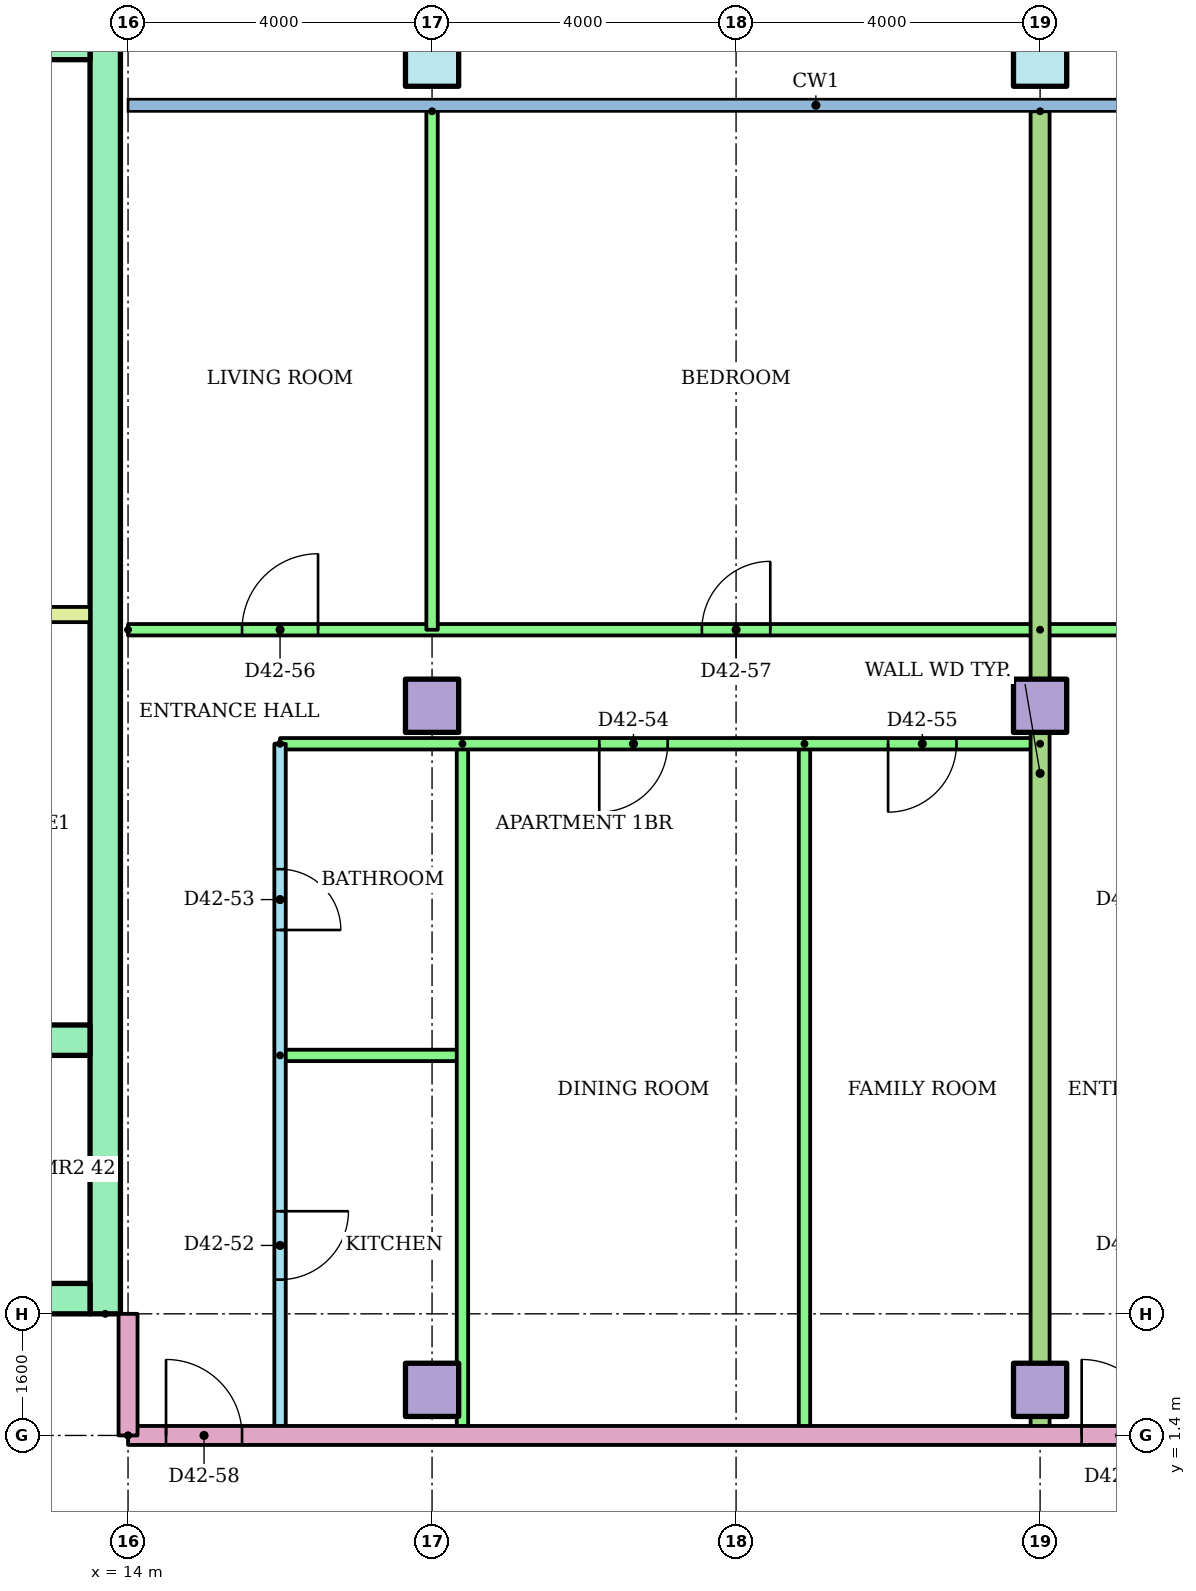
"""IFC4 building model, lengths in metres.
Left out: names, types, materials, properties, quantities, classifications, styles, units other than length and angle.
Written with IfcOpenShell. Run it as: python <this file> out.ifc"""

import sys

from ifc_helpers import new_model, si_unit, direction, frame, frame_2d, origin, origin_2d, place, context, subcontext, project, spatial, rectangle, hollow_rectangle, extrude, element, fill, save


model = new_model("IFC4")
c1 = context("Model", 3, precision=1e-05, world=origin(), true_north=direction((0.0, 1.0)))
c2 = subcontext(c1, "Body", "Model", "MODEL_VIEW")
j1 = project(units=[si_unit("LENGTHUNIT", "METRE"), si_unit("PLANEANGLEUNIT", "RADIAN")], contexts=[c1])
p1 = place(None, origin())
s1 = spatial("IfcSite", under=j1, at=p1, CompositionType="ELEMENT")
p2 = place(p1, origin())
s2 = spatial("IfcBuilding", under=s1, at=p2, CompositionType="ELEMENT")
p3 = place(p2, frame((0.0, 0.0, 165.3)))
s3 = spatial("IfcBuildingStorey", under=s2, at=p3, CompositionType="ELEMENT", Elevation=165.3)
for number, where in (
    (1, (18.0, 2.0, 0.0)),
    (2, (26.0, 2.0, 0.0)),
    (3, (18.0, 11.0, 0.0)),
    (4, (26.0, 11.0, 0.0)),
):
    element("IfcColumn", number, at=place(p3, frame(where)), inside=s3, PredefinedType="COLUMN", context=c2, shape_type="SweptSolid", body=[
        extrude(rectangle(XDim=0.7, YDim=0.7, at=origin_2d()), origin(), (0.0, 0.0, 1.0), 3.2),
    ])
for number, where in (
    (5, (18.0, 19.5, 0.0)),
    (6, (26.0, 19.5, 0.0)),
):
    element("IfcColumn", number, at=place(p3, frame(where)), inside=s3, PredefinedType="COLUMN", context=c2, shape_type="SweptSolid", body=[
        extrude(hollow_rectangle(XDim=0.7, YDim=0.7, WallThickness=0.036, at=origin_2d()), origin(), (0.0, 0.0, 1.0), 3.2),
    ])
p4 = place(p3, frame((13.7, 3.0, 0.0), z_axis=(0.0, 0.0, 1.0), x_axis=(0.0, 1.0, 0.0)))
e7 = element("IfcWall", 7, at=p4, inside=s3, PredefinedType="SHEAR", context=c2, shape_type="SweptSolid", body=[
    extrude(rectangle(XDim=17.0, YDim=0.4, at=frame_2d((8.5, 0.0))), origin(), (0.0, 0.0, 1.0), 2.92),
])
p5 = place(p3, frame((-13.5, 19.7, 0.0)))
e8 = element("IfcWall", 8, at=p5, inside=s3, PredefinedType="SHEAR", context=c2, shape_type="SweptSolid", body=[
    extrude(rectangle(XDim=27.0, YDim=0.4, at=frame_2d((13.5, 0.0))), origin(), (0.0, 0.0, 1.0), 2.92),
])
p6 = place(p3, frame((-13.5, 3.2, 0.0)))
e9 = element("IfcWall", 9, at=p6, inside=s3, PredefinedType="SHEAR", context=c2, shape_type="SweptSolid", body=[
    extrude(rectangle(XDim=27.0, YDim=0.4, at=frame_2d((13.5, 0.0))), origin(), (0.0, 0.0, 1.0), 2.92),
])
p7 = place(p6, frame((22.083, 0.0, 0.0)))
e10 = element("IfcOpeningElement", 10, at=p7, cuts=e9, PredefinedType="OPENING", context=c2, shape_type="SweptSolid", body=[
    extrude(rectangle(XDim=1.1, YDim=2.1, at=frame_2d((0.55, 1.05))), frame((0.0, 0.21, 0.0), z_axis=(0.0, -1.0, 0.0), x_axis=(1.0, 0.0, 0.0)), (0.0, 0.0, 1.0), 0.42),
])
p8 = place(p6, frame((25.128, 0.0, 0.0)))
e11 = element("IfcOpeningElement", 11, at=p8, cuts=e9, PredefinedType="OPENING", context=c2, shape_type="SweptSolid", body=[
    extrude(rectangle(XDim=1.1, YDim=2.1, at=frame_2d((0.55, 1.05))), frame((0.0, 0.21, 0.0), z_axis=(0.0, -1.0, 0.0), x_axis=(1.0, 0.0, 0.0)), (0.0, 0.0, 1.0), 0.42),
])
p9 = place(p6, frame((12.6, 0.0, 0.0)))
e12 = element("IfcOpeningElement", 12, at=p9, cuts=e9, PredefinedType="OPENING", context=c2, shape_type="SweptSolid", body=[
    extrude(rectangle(XDim=1.8, YDim=2.1, at=frame_2d((0.9, 1.05))), frame((0.0, 0.21, 0.0), z_axis=(0.0, -1.0, 0.0), x_axis=(1.0, 0.0, 0.0)), (0.0, 0.0, 1.0), 0.42),
])
p10 = place(p3, frame((1.522, 6.6, 0.0)))
e13 = element("IfcWall", 13, at=p10, inside=s3, PredefinedType="SHEAR", context=c2, shape_type="SweptSolid", body=[
    extrude(rectangle(XDim=11.978, YDim=0.4, at=frame_2d((5.989, 0.0))), origin(), (0.0, 0.0, 1.0), 2.92),
])
p11 = place(p10, frame((2.544, 0.0, 0.0)))
e14 = element("IfcOpeningElement", 14, at=p11, cuts=e13, PredefinedType="OPENING", context=c2, shape_type="SweptSolid", body=[
    extrude(rectangle(XDim=1.0, YDim=2.1, at=frame_2d((0.5, 1.05))), frame((0.0, 0.21, 0.0), z_axis=(0.0, -1.0, 0.0), x_axis=(1.0, 0.0, 0.0)), (0.0, 0.0, 1.0), 0.42),
])
p12 = place(p3, frame((9.6, 12.2, 0.0)))
e15 = element("IfcWall", 15, at=p12, inside=s3, PredefinedType="PARTITIONING", context=c2, shape_type="SweptSolid", body=[
    extrude(rectangle(XDim=3.9, YDim=0.2, at=frame_2d((1.95, 0.0))), origin(), (0.0, 0.0, 1.0), 2.92),
])
p13 = place(p3, frame((16.0, 10.5, 0.0), z_axis=(0.0, 0.0, 1.0), x_axis=(0.0, -1.0, 0.0)))
e16 = element("IfcWall", 16, at=p13, inside=s3, PredefinedType="PARTITIONING", context=c2, shape_type="SweptSolid", body=[
    extrude(rectangle(XDim=9.1, YDim=0.15, at=frame_2d((4.55, 0.0))), origin(), (0.0, 0.0, 1.0), 2.4),
])
p14 = place(p13, frame((6.15, 0.0, 0.0)))
e17 = element("IfcOpeningElement", 17, at=p14, cuts=e16, PredefinedType="OPENING", context=c2, shape_type="SweptSolid", body=[
    extrude(rectangle(XDim=0.9, YDim=2.1, at=frame_2d((0.45, 1.05))), frame((0.0, 0.085, 0.0), z_axis=(0.0, -1.0, 0.0), x_axis=(1.0, 0.0, 0.0)), (0.0, 0.0, 1.0), 0.17),
])
p15 = place(p13, frame((1.65, 0.0, 0.0)))
e18 = element("IfcOpeningElement", 18, at=p15, cuts=e16, PredefinedType="OPENING", context=c2, shape_type="SweptSolid", body=[
    extrude(rectangle(XDim=0.8, YDim=2.1, at=frame_2d((0.4, 1.05))), frame((0.0, 0.085, 0.0), z_axis=(0.0, -1.0, 0.0), x_axis=(1.0, 0.0, 0.0)), (0.0, 0.0, 1.0), 0.17),
])
p16 = place(p3, frame((16.0, 6.4, 0.0)))
e19 = element("IfcWall", 19, at=p16, inside=s3, PredefinedType="PARTITIONING", context=c2, shape_type="SweptSolid", body=[
    extrude(rectangle(XDim=2.4, YDim=0.15, at=frame_2d((1.2, 0.0))), origin(), (0.0, 0.0, 1.0), 2.4),
])
for number, where, z_axis, x_axis in (
    (20, (18.4, 10.5, 0.0), (0.0, 0.0, 1.0), (0.0, -1.0, 0.0)),
    (21, (22.9, 10.5, 0.0), (0.0, 0.0, 1.0), (0.0, -1.0, 0.0)),
):
    element("IfcWall", number, at=place(p3, frame(where, z_axis=z_axis, x_axis=x_axis)), inside=s3, PredefinedType="PARTITIONING", context=c2, shape_type="SweptSolid", body=[
        extrude(rectangle(XDim=9.1, YDim=0.15, at=frame_2d((4.55, 0.0))), origin(), (0.0, 0.0, 1.0), 2.4),
    ])
p17 = place(p3, frame((26.0, 10.5, 0.0), z_axis=(0.0, 0.0, 1.0), x_axis=(-1.0, 0.0, 0.0)))
e22 = element("IfcWall", 22, at=p17, inside=s3, PredefinedType="PARTITIONING", context=c2, shape_type="SweptSolid", body=[
    extrude(rectangle(XDim=10.0, YDim=0.15, at=frame_2d((5.0, 0.0))), origin(), (0.0, 0.0, 1.0), 2.4),
])
p18 = place(p17, frame((4.9, 0.0, 0.0)))
e23 = element("IfcOpeningElement", 23, at=p18, cuts=e22, PredefinedType="OPENING", context=c2, shape_type="SweptSolid", body=[
    extrude(rectangle(XDim=0.9, YDim=2.1, at=frame_2d((0.45, 1.05))), frame((0.0, 0.085, 0.0), z_axis=(0.0, -1.0, 0.0), x_axis=(1.0, 0.0, 0.0)), (0.0, 0.0, 1.0), 0.17),
])
p19 = place(p17, frame((1.1, 0.0, 0.0)))
e24 = element("IfcOpeningElement", 24, at=p19, cuts=e22, PredefinedType="OPENING", context=c2, shape_type="SweptSolid", body=[
    extrude(rectangle(XDim=0.9, YDim=2.1, at=frame_2d((0.45, 1.05))), frame((0.0, 0.085, 0.0), z_axis=(0.0, -1.0, 0.0), x_axis=(1.0, 0.0, 0.0)), (0.0, 0.0, 1.0), 0.17),
])
p20 = place(p3, frame((14.0, 12.0, 0.0)))
e25 = element("IfcWall", 25, at=p20, inside=s3, PredefinedType="PARTITIONING", context=c2, shape_type="SweptSolid", body=[
    extrude(rectangle(XDim=12.0, YDim=0.15, at=frame_2d((6.0, 0.0))), origin(), (0.0, 0.0, 1.0), 2.4),
])
p21 = place(p20, frame((1.5, 0.0, 0.0)))
e26 = element("IfcOpeningElement", 26, at=p21, cuts=e25, PredefinedType="OPENING", context=c2, shape_type="SweptSolid", body=[
    extrude(rectangle(XDim=1.0, YDim=2.1, at=frame_2d((0.5, 1.05))), frame((0.0, 0.085, 0.0), z_axis=(0.0, -1.0, 0.0), x_axis=(1.0, 0.0, 0.0)), (0.0, 0.0, 1.0), 0.17),
])
p22 = place(p20, frame((7.55, 0.0, 0.0)))
e27 = element("IfcOpeningElement", 27, at=p22, cuts=e25, PredefinedType="OPENING", context=c2, shape_type="SweptSolid", body=[
    extrude(rectangle(XDim=0.9, YDim=2.1, at=frame_2d((0.45, 1.05))), frame((0.0, 0.085, 0.0), z_axis=(0.0, -1.0, 0.0), x_axis=(1.0, 0.0, 0.0)), (0.0, 0.0, 1.0), 0.17),
])
p23 = place(p3, frame((18.0, 18.821, 0.0), z_axis=(0.0, 0.0, 1.0), x_axis=(0.0, -1.0, 0.0)))
e28 = element("IfcWall", 28, at=p23, inside=s3, PredefinedType="PARTITIONING", context=c2, shape_type="SweptSolid", body=[
    extrude(rectangle(XDim=6.821, YDim=0.15, at=frame_2d((3.411, 0.0))), origin(), (0.0, 0.0, 1.0), 2.4),
])
p24 = place(p3, frame((26.0, 12.0, 0.0)))
e29 = element("IfcWall", 29, at=p24, inside=s3, PredefinedType="PARTITIONING", context=c2, shape_type="SweptSolid", body=[
    extrude(rectangle(XDim=10.82, YDim=0.15, at=frame_2d((5.41, 0.0))), origin(), (0.0, 0.0, 1.0), 2.4),
])
p25 = place(p24, frame((2.55, 0.0, 0.0)))
e30 = element("IfcOpeningElement", 30, at=p25, cuts=e29, PredefinedType="OPENING", context=c2, shape_type="SweptSolid", body=[
    extrude(rectangle(XDim=1.0, YDim=2.1, at=frame_2d((0.5, 1.05))), frame((0.0, 0.085, 0.0), z_axis=(0.0, -1.0, 0.0), x_axis=(1.0, 0.0, 0.0)), (0.0, 0.0, 1.0), 0.17),
])
p26 = place(p24, frame((8.547, 0.0, 0.0)))
e31 = element("IfcOpeningElement", 31, at=p26, cuts=e29, PredefinedType="OPENING", context=c2, shape_type="SweptSolid", body=[
    extrude(rectangle(XDim=0.9, YDim=2.1, at=frame_2d((0.45, 1.05))), frame((0.0, 0.085, 0.0), z_axis=(0.0, -1.0, 0.0), x_axis=(1.0, 0.0, 0.0)), (0.0, 0.0, 1.0), 0.17),
])
p27 = place(p3, frame((26.0, 18.821, 0.0), z_axis=(0.0, 0.0, 1.0), x_axis=(0.0, -1.0, 0.0)))
e32 = element("IfcWall", 32, at=p27, inside=s3, PredefinedType="PARTITIONING", context=c2, shape_type="SweptSolid", body=[
    extrude(rectangle(XDim=17.421, YDim=0.25, at=frame_2d((8.71, 0.0))), origin(), (0.0, 0.0, 1.0), 2.4),
])
p28 = place(p3, frame((14.0, 1.4, 0.0)))
e33 = element("IfcWall", 33, at=p28, inside=s3, PredefinedType="PARTITIONING", context=c2, shape_type="SweptSolid", body=[
    extrude(rectangle(XDim=15.0, YDim=0.25, at=frame_2d((7.5, 0.0))), origin(), (0.0, 0.0, 1.0), 2.4),
])
p29 = place(p28, frame((0.5, 0.0, 0.0)))
e34 = element("IfcOpeningElement", 34, at=p29, cuts=e33, PredefinedType="OPENING", context=c2, shape_type="SweptSolid", body=[
    extrude(rectangle(XDim=1.0, YDim=2.1, at=frame_2d((0.5, 1.05))), frame((0.0, 0.135, 0.0), z_axis=(0.0, -1.0, 0.0), x_axis=(1.0, 0.0, 0.0)), (0.0, 0.0, 1.0), 0.27),
])
p30 = place(p28, frame((12.547, 0.0, 0.0)))
e35 = element("IfcOpeningElement", 35, at=p30, cuts=e33, PredefinedType="OPENING", context=c2, shape_type="SweptSolid", body=[
    extrude(rectangle(XDim=1.0, YDim=2.1, at=frame_2d((0.5, 1.05))), frame((0.0, 0.135, 0.0), z_axis=(0.0, -1.0, 0.0), x_axis=(1.0, 0.0, 0.0)), (0.0, 0.0, 1.0), 0.27),
])
p31 = place(p3, frame((14.0, 1.4, 0.0), z_axis=(0.0, 0.0, 1.0), x_axis=(0.0, 1.0, 0.0)))
e36 = element("IfcWall", 36, at=p31, inside=s3, PredefinedType="PARTITIONING", context=c2, shape_type="SweptSolid", body=[
    extrude(rectangle(XDim=1.6, YDim=0.25, at=frame_2d((0.8, 0.0))), origin(), (0.0, 0.0, 1.0), 2.4),
])
p32 = place(p14, origin())
e37 = element("IfcDoor", 37, at=p32, inside=s3, OperationType="SINGLE_SWING_LEFT", PredefinedType="DOOR", context=c2, shape_type="SweptSolid", body=[
    extrude(rectangle(XDim=0.9, YDim=2.1, at=frame_2d((0.45, 1.05))), frame((0.0, 0.025, 0.0), z_axis=(0.0, -1.0, 0.0), x_axis=(1.0, 0.0, 0.0)), (0.0, 0.0, 1.0), 0.05),
])
fill(e17, e37)
p33 = place(p15, origin())
e38 = element("IfcDoor", 38, at=p33, inside=s3, OperationType="SINGLE_SWING_RIGHT", PredefinedType="DOOR", context=c2, shape_type="SweptSolid", body=[
    extrude(rectangle(XDim=0.8, YDim=2.1, at=frame_2d((0.4, 1.05))), frame((0.0, 0.025, 0.0), z_axis=(0.0, -1.0, 0.0), x_axis=(1.0, 0.0, 0.0)), (0.0, 0.0, 1.0), 0.05),
])
fill(e18, e38)
p34 = place(p18, origin())
e39 = element("IfcDoor", 39, at=p34, inside=s3, OperationType="SINGLE_SWING_RIGHT", PredefinedType="DOOR", context=c2, shape_type="SweptSolid", body=[
    extrude(rectangle(XDim=0.9, YDim=2.1, at=frame_2d((0.45, 1.05))), frame((0.0, 0.025, 0.0), z_axis=(0.0, -1.0, 0.0), x_axis=(1.0, 0.0, 0.0)), (0.0, 0.0, 1.0), 0.05),
])
fill(e23, e39)
p35 = place(p19, origin())
e40 = element("IfcDoor", 40, at=p35, inside=s3, OperationType="SINGLE_SWING_RIGHT", PredefinedType="DOOR", context=c2, shape_type="SweptSolid", body=[
    extrude(rectangle(XDim=0.9, YDim=2.1, at=frame_2d((0.45, 1.05))), frame((0.0, 0.025, 0.0), z_axis=(0.0, -1.0, 0.0), x_axis=(1.0, 0.0, 0.0)), (0.0, 0.0, 1.0), 0.05),
])
fill(e24, e40)
p36 = place(p21, origin())
e41 = element("IfcDoor", 41, at=p36, inside=s3, OperationType="SINGLE_SWING_RIGHT", PredefinedType="DOOR", context=c2, shape_type="SweptSolid", body=[
    extrude(rectangle(XDim=1.0, YDim=2.1, at=frame_2d((0.5, 1.05))), frame((0.0, 0.025, 0.0), z_axis=(0.0, -1.0, 0.0), x_axis=(1.0, 0.0, 0.0)), (0.0, 0.0, 1.0), 0.05),
])
fill(e26, e41)
p37 = place(p22, origin())
e42 = element("IfcDoor", 42, at=p37, inside=s3, OperationType="SINGLE_SWING_RIGHT", PredefinedType="DOOR", context=c2, shape_type="SweptSolid", body=[
    extrude(rectangle(XDim=0.9, YDim=2.1, at=frame_2d((0.45, 1.05))), frame((0.0, 0.025, 0.0), z_axis=(0.0, -1.0, 0.0), x_axis=(1.0, 0.0, 0.0)), (0.0, 0.0, 1.0), 0.05),
])
fill(e27, e42)
p38 = place(p29, origin())
e43 = element("IfcDoor", 43, at=p38, inside=s3, OperationType="SINGLE_SWING_LEFT", PredefinedType="DOOR", context=c2, shape_type="SweptSolid", body=[
    extrude(rectangle(XDim=1.0, YDim=2.1, at=frame_2d((0.5, 1.05))), frame((0.0, 0.025, 0.0), z_axis=(0.0, -1.0, 0.0), x_axis=(1.0, 0.0, 0.0)), (0.0, 0.0, 1.0), 0.05),
])
fill(e34, e43)
p39 = place(p30, origin())
e44 = element("IfcDoor", 44, at=p39, inside=s3, OperationType="SINGLE_SWING_LEFT", PredefinedType="DOOR", context=c2, shape_type="SweptSolid", body=[
    extrude(rectangle(XDim=1.0, YDim=2.1, at=frame_2d((0.5, 1.05))), frame((0.0, 0.025, 0.0), z_axis=(0.0, -1.0, 0.0), x_axis=(1.0, 0.0, 0.0)), (0.0, 0.0, 1.0), 0.05),
])
fill(e35, e44)
save(model, sys.argv[1])
